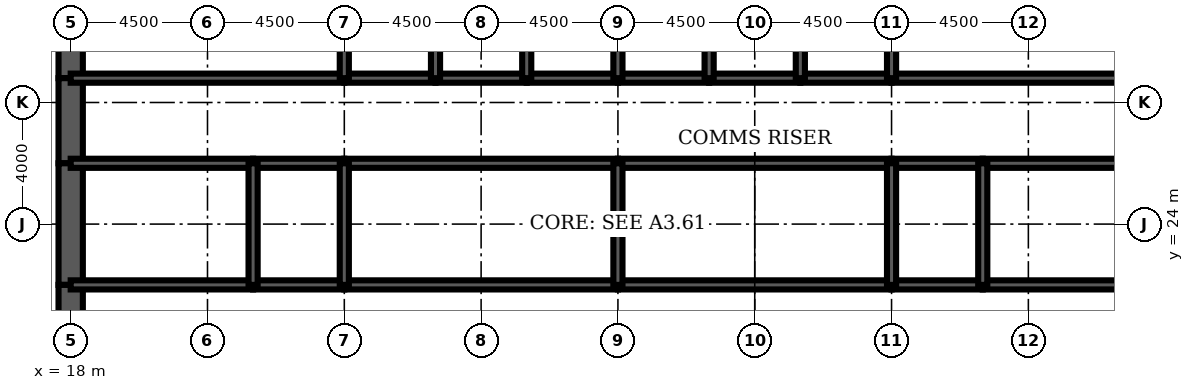
"""IFC4 building model, lengths in metres.
Left out: names, types, materials, properties, quantities, classifications, styles, units other than length and angle.
Written with IfcOpenShell. Run it as: python <this file> out.ifc"""

import sys

from ifc_helpers import new_model, si_unit, direction, frame, frame_2d, origin, place, context, subcontext, project, spatial, rectangle, extrude, element, fill, save


model = new_model("IFC4")
c1 = context("Model", 3, precision=1e-05, world=origin(), true_north=direction((0.0, 1.0)))
c2 = subcontext(c1, "Body", "Model", "MODEL_VIEW")
j1 = project(units=[si_unit("LENGTHUNIT", "METRE"), si_unit("PLANEANGLEUNIT", "RADIAN")], contexts=[c1])
p1 = place(None, origin())
s1 = spatial("IfcSite", under=j1, at=p1, CompositionType="ELEMENT")
p2 = place(p1, origin())
s2 = spatial("IfcBuilding", under=s1, at=p2, CompositionType="ELEMENT")
p3 = place(p2, frame((0.0, 0.0, 261.4)))
s3 = spatial("IfcBuildingStorey", under=s2, at=p3, CompositionType="ELEMENT", Elevation=261.4)
p4 = place(p3, frame((18.0, 32.0, 0.0), z_axis=(0.0, 0.0, 1.0), x_axis=(0.0, -1.0, 0.0)))
e1 = element("IfcWall", 1, at=p4, inside=s3, PredefinedType="SHEAR", context=c2, shape_type="SweptSolid", body=[
    extrude(rectangle(XDim=3.2, YDim=0.8, at=frame_2d((1.6, 0.0))), origin(), (0.0, 0.0, 1.0), 4.2),
])
p5 = place(p3, frame((18.0, 28.8, 0.0), z_axis=(0.0, 0.0, 1.0), x_axis=(0.0, -1.0, 0.0)))
e2 = element("IfcWall", 2, at=p5, inside=s3, PredefinedType="SHEAR", context=c2, shape_type="SweptSolid", body=[
    extrude(rectangle(XDim=2.8, YDim=0.8, at=frame_2d((1.4, 0.0))), origin(), (0.0, 0.0, 1.0), 4.2),
])
p6 = place(p5, frame((0.4, 0.0, 0.0)))
e3 = element("IfcOpeningElement", 3, at=p6, cuts=e2, PredefinedType="OPENING", context=c2, shape_type="SweptSolid", body=[
    extrude(rectangle(XDim=1.8, YDim=2.1, at=frame_2d((0.9, 1.05))), frame((0.0, 0.41, 0.0), z_axis=(0.0, -1.0, 0.0), x_axis=(1.0, 0.0, 0.0)), (0.0, 0.0, 1.0), 0.82),
])
p7 = place(p3, frame((18.0, 26.0, 0.0), z_axis=(0.0, 0.0, 1.0), x_axis=(0.0, -1.0, 0.0)))
e4 = element("IfcWall", 4, at=p7, inside=s3, PredefinedType="SHEAR", context=c2, shape_type="SweptSolid", body=[
    extrude(rectangle(XDim=4.0, YDim=0.8, at=frame_2d((2.0, 0.0))), origin(), (0.0, 0.0, 1.0), 4.2),
])
p8 = place(p3, frame((18.0, 22.0, 0.0), z_axis=(0.0, 0.0, 1.0), x_axis=(0.0, -1.0, 0.0)))
e5 = element("IfcWall", 5, at=p8, inside=s3, PredefinedType="SHEAR", context=c2, shape_type="SweptSolid", body=[
    extrude(rectangle(XDim=2.8, YDim=0.8, at=frame_2d((1.4, 0.0))), origin(), (0.0, 0.0, 1.0), 4.2),
])
p9 = place(p8, frame((0.6, 0.0, 0.0)))
e6 = element("IfcOpeningElement", 6, at=p9, cuts=e5, PredefinedType="OPENING", context=c2, shape_type="SweptSolid", body=[
    extrude(rectangle(XDim=1.8, YDim=2.1, at=frame_2d((0.9, 1.05))), frame((0.0, 0.41, 0.0), z_axis=(0.0, -1.0, 0.0), x_axis=(1.0, 0.0, 0.0)), (0.0, 0.0, 1.0), 0.82),
])
p10 = place(p3, frame((18.0, 28.8, 0.0), z_axis=(0.0, 0.0, 1.0), x_axis=(1.0, 0.0, 0.0)))
e7 = element("IfcWall", 7, at=p10, inside=s3, PredefinedType="SOLIDWALL", context=c2, shape_type="SweptSolid", body=[
    extrude(rectangle(XDim=9.0, YDim=0.3, at=frame_2d((4.5, 0.0))), origin(), (0.0, 0.0, 1.0), 4.2),
])
p11 = place(p10, frame((0.65, 0.0, 0.0)))
e8 = element("IfcOpeningElement", 8, at=p11, cuts=e7, PredefinedType="OPENING", context=c2, shape_type="SweptSolid", body=[
    extrude(rectangle(XDim=1.0, YDim=2.1, at=frame_2d((0.5, 1.05))), frame((0.0, 0.16, 0.0), z_axis=(0.0, -1.0, 0.0), x_axis=(1.0, 0.0, 0.0)), (0.0, 0.0, 1.0), 0.32),
])
p12 = place(p3, frame((27.0, 28.8, 0.0), z_axis=(0.0, 0.0, 1.0), x_axis=(1.0, 0.0, 0.0)))
e9 = element("IfcWall", 9, at=p12, inside=s3, PredefinedType="SOLIDWALL", context=c2, shape_type="SweptSolid", body=[
    extrude(rectangle(XDim=3.0, YDim=0.3, at=frame_2d((1.5, 0.0))), origin(), (0.0, 0.0, 1.0), 4.2),
])
p13 = place(p12, frame((0.95, 0.0, 0.0)))
e10 = element("IfcOpeningElement", 10, at=p13, cuts=e9, PredefinedType="OPENING", context=c2, shape_type="SweptSolid", body=[
    extrude(rectangle(XDim=1.1, YDim=2.2, at=frame_2d((0.55, 1.1))), frame((0.0, 0.16, 0.0), z_axis=(0.0, -1.0, 0.0), x_axis=(1.0, 0.0, 0.0)), (0.0, 0.0, 1.0), 0.32),
])
p14 = place(p3, frame((30.0, 28.8, 0.0), z_axis=(0.0, 0.0, 1.0), x_axis=(1.0, 0.0, 0.0)))
e11 = element("IfcWall", 11, at=p14, inside=s3, PredefinedType="SOLIDWALL", context=c2, shape_type="SweptSolid", body=[
    extrude(rectangle(XDim=3.0, YDim=0.3, at=frame_2d((1.5, 0.0))), origin(), (0.0, 0.0, 1.0), 4.2),
])
p15 = place(p14, frame((0.95, 0.0, 0.0)))
e12 = element("IfcOpeningElement", 12, at=p15, cuts=e11, PredefinedType="OPENING", context=c2, shape_type="SweptSolid", body=[
    extrude(rectangle(XDim=1.1, YDim=2.2, at=frame_2d((0.55, 1.1))), frame((0.0, 0.16, 0.0), z_axis=(0.0, -1.0, 0.0), x_axis=(1.0, 0.0, 0.0)), (0.0, 0.0, 1.0), 0.32),
])
p16 = place(p3, frame((33.0, 28.8, 0.0), z_axis=(0.0, 0.0, 1.0), x_axis=(1.0, 0.0, 0.0)))
e13 = element("IfcWall", 13, at=p16, inside=s3, PredefinedType="SOLIDWALL", context=c2, shape_type="SweptSolid", body=[
    extrude(rectangle(XDim=3.0, YDim=0.3, at=frame_2d((1.5, 0.0))), origin(), (0.0, 0.0, 1.0), 4.2),
])
p17 = place(p16, frame((0.95, 0.0, 0.0)))
e14 = element("IfcOpeningElement", 14, at=p17, cuts=e13, PredefinedType="OPENING", context=c2, shape_type="SweptSolid", body=[
    extrude(rectangle(XDim=1.1, YDim=2.2, at=frame_2d((0.55, 1.1))), frame((0.0, 0.16, 0.0), z_axis=(0.0, -1.0, 0.0), x_axis=(1.0, 0.0, 0.0)), (0.0, 0.0, 1.0), 0.32),
])
for number, where, z_axis, x_axis in (
    (15, (36.0, 28.8, 0.0), (0.0, 0.0, 1.0), (1.0, 0.0, 0.0)),
    (16, (39.0, 28.8, 0.0), (0.0, 0.0, 1.0), (1.0, 0.0, 0.0)),
):
    element("IfcWall", number, at=place(p3, frame(where, z_axis=z_axis, x_axis=x_axis)), inside=s3, PredefinedType="SOLIDWALL", context=c2, shape_type="SweptSolid", body=[
        extrude(rectangle(XDim=3.0, YDim=0.3, at=frame_2d((1.5, 0.0))), origin(), (0.0, 0.0, 1.0), 4.2),
    ])
p18 = place(p3, frame((42.0, 28.8, 0.0), z_axis=(0.0, 0.0, 1.0), x_axis=(1.0, 0.0, 0.0)))
e17 = element("IfcWall", 17, at=p18, inside=s3, PredefinedType="SOLIDWALL", context=c2, shape_type="SweptSolid", body=[
    extrude(rectangle(XDim=3.0, YDim=0.3, at=frame_2d((1.5, 0.0))), origin(), (0.0, 0.0, 1.0), 4.2),
])
p19 = place(p18, frame((0.95, 0.0, 0.0)))
e18 = element("IfcOpeningElement", 18, at=p19, cuts=e17, PredefinedType="OPENING", context=c2, shape_type="SweptSolid", body=[
    extrude(rectangle(XDim=1.1, YDim=2.2, at=frame_2d((0.55, 1.1))), frame((0.0, 0.16, 0.0), z_axis=(0.0, -1.0, 0.0), x_axis=(1.0, 0.0, 0.0)), (0.0, 0.0, 1.0), 0.32),
])
p20 = place(p3, frame((45.0, 28.8, 0.0), z_axis=(0.0, 0.0, 1.0), x_axis=(1.0, 0.0, 0.0)))
e19 = element("IfcWall", 19, at=p20, inside=s3, PredefinedType="SOLIDWALL", context=c2, shape_type="SweptSolid", body=[
    extrude(rectangle(XDim=9.0, YDim=0.3, at=frame_2d((4.5, 0.0))), origin(), (0.0, 0.0, 1.0), 4.2),
])
p21 = place(p20, frame((7.35, 0.0, 0.0)))
e20 = element("IfcOpeningElement", 20, at=p21, cuts=e19, PredefinedType="OPENING", context=c2, shape_type="SweptSolid", body=[
    extrude(rectangle(XDim=1.0, YDim=2.1, at=frame_2d((0.5, 1.05))), frame((0.0, 0.16, 0.0), z_axis=(0.0, -1.0, 0.0), x_axis=(1.0, 0.0, 0.0)), (0.0, 0.0, 1.0), 0.32),
])
p22 = place(p3, frame((18.0, 22.0, 0.0), z_axis=(0.0, 0.0, 1.0), x_axis=(1.0, 0.0, 0.0)))
e21 = element("IfcWall", 21, at=p22, inside=s3, PredefinedType="SOLIDWALL", context=c2, shape_type="SweptSolid", body=[
    extrude(rectangle(XDim=6.0, YDim=0.3, at=frame_2d((3.0, 0.0))), origin(), (0.0, 0.0, 1.0), 4.2),
])
p23 = place(p22, frame((4.4, 0.0, 0.0)))
e22 = element("IfcOpeningElement", 22, at=p23, cuts=e21, PredefinedType="OPENING", context=c2, shape_type="SweptSolid", body=[
    extrude(rectangle(XDim=1.0, YDim=2.1, at=frame_2d((0.5, 1.05))), frame((0.0, 0.16, 0.0), z_axis=(0.0, -1.0, 0.0), x_axis=(1.0, 0.0, 0.0)), (0.0, 0.0, 1.0), 0.32),
])
p24 = place(p22, frame((0.95, 0.0, 0.0)))
e23 = element("IfcOpeningElement", 23, at=p24, cuts=e21, PredefinedType="OPENING", context=c2, shape_type="SweptSolid", body=[
    extrude(rectangle(XDim=1.0, YDim=2.1, at=frame_2d((0.5, 1.05))), frame((0.0, 0.16, 0.0), z_axis=(0.0, -1.0, 0.0), x_axis=(1.0, 0.0, 0.0)), (0.0, 0.0, 1.0), 0.32),
])
p25 = place(p3, frame((24.0, 22.0, 0.0), z_axis=(0.0, 0.0, 1.0), x_axis=(1.0, 0.0, 0.0)))
e24 = element("IfcWall", 24, at=p25, inside=s3, PredefinedType="SOLIDWALL", context=c2, shape_type="SweptSolid", body=[
    extrude(rectangle(XDim=3.0, YDim=0.3, at=frame_2d((1.5, 0.0))), origin(), (0.0, 0.0, 1.0), 4.2),
])
p26 = place(p25, frame((1.0, 0.0, 0.0)))
e25 = element("IfcOpeningElement", 25, at=p26, cuts=e24, PredefinedType="OPENING", context=c2, shape_type="SweptSolid", body=[
    extrude(rectangle(XDim=1.0, YDim=2.1, at=frame_2d((0.5, 1.05))), frame((0.0, 0.16, 0.0), z_axis=(0.0, -1.0, 0.0), x_axis=(1.0, 0.0, 0.0)), (0.0, 0.0, 1.0), 0.32),
])
p27 = place(p3, frame((27.0, 22.0, 0.0), z_axis=(0.0, 0.0, 1.0), x_axis=(1.0, 0.0, 0.0)))
e26 = element("IfcWall", 26, at=p27, inside=s3, PredefinedType="SOLIDWALL", context=c2, shape_type="SweptSolid", body=[
    extrude(rectangle(XDim=9.0, YDim=0.3, at=frame_2d((4.5, 0.0))), origin(), (0.0, 0.0, 1.0), 4.2),
])
p28 = place(p27, frame((4.0, 0.0, 0.0)))
e27 = element("IfcOpeningElement", 27, at=p28, cuts=e26, PredefinedType="OPENING", context=c2, shape_type="SweptSolid", body=[
    extrude(rectangle(XDim=1.0, YDim=2.1, at=frame_2d((0.5, 1.05))), frame((0.0, 0.16, 0.0), z_axis=(0.0, -1.0, 0.0), x_axis=(1.0, 0.0, 0.0)), (0.0, 0.0, 1.0), 0.32),
])
p29 = place(p3, frame((36.0, 22.0, 0.0), z_axis=(0.0, 0.0, 1.0), x_axis=(1.0, 0.0, 0.0)))
e28 = element("IfcWall", 28, at=p29, inside=s3, PredefinedType="SOLIDWALL", context=c2, shape_type="SweptSolid", body=[
    extrude(rectangle(XDim=9.0, YDim=0.3, at=frame_2d((4.5, 0.0))), origin(), (0.0, 0.0, 1.0), 4.2),
])
p30 = place(p29, frame((4.0, 0.0, 0.0)))
e29 = element("IfcOpeningElement", 29, at=p30, cuts=e28, PredefinedType="OPENING", context=c2, shape_type="SweptSolid", body=[
    extrude(rectangle(XDim=1.0, YDim=2.1, at=frame_2d((0.5, 1.05))), frame((0.0, 0.16, 0.0), z_axis=(0.0, -1.0, 0.0), x_axis=(1.0, 0.0, 0.0)), (0.0, 0.0, 1.0), 0.32),
])
p31 = place(p3, frame((45.0, 22.0, 0.0), z_axis=(0.0, 0.0, 1.0), x_axis=(1.0, 0.0, 0.0)))
e30 = element("IfcWall", 30, at=p31, inside=s3, PredefinedType="SOLIDWALL", context=c2, shape_type="SweptSolid", body=[
    extrude(rectangle(XDim=3.0, YDim=0.3, at=frame_2d((1.5, 0.0))), origin(), (0.0, 0.0, 1.0), 4.2),
])
p32 = place(p31, frame((1.0, 0.0, 0.0)))
e31 = element("IfcOpeningElement", 31, at=p32, cuts=e30, PredefinedType="OPENING", context=c2, shape_type="SweptSolid", body=[
    extrude(rectangle(XDim=1.0, YDim=2.1, at=frame_2d((0.5, 1.05))), frame((0.0, 0.16, 0.0), z_axis=(0.0, -1.0, 0.0), x_axis=(1.0, 0.0, 0.0)), (0.0, 0.0, 1.0), 0.32),
])
p33 = place(p3, frame((48.0, 22.0, 0.0), z_axis=(0.0, 0.0, 1.0), x_axis=(1.0, 0.0, 0.0)))
e32 = element("IfcWall", 32, at=p33, inside=s3, PredefinedType="SOLIDWALL", context=c2, shape_type="SweptSolid", body=[
    extrude(rectangle(XDim=6.0, YDim=0.3, at=frame_2d((3.0, 0.0))), origin(), (0.0, 0.0, 1.0), 4.2),
])
p34 = place(p33, frame((2.0, 0.0, 0.0)))
e33 = element("IfcOpeningElement", 33, at=p34, cuts=e32, PredefinedType="OPENING", context=c2, shape_type="SweptSolid", body=[
    extrude(rectangle(XDim=1.0, YDim=2.1, at=frame_2d((0.5, 1.05))), frame((0.0, 0.16, 0.0), z_axis=(0.0, -1.0, 0.0), x_axis=(1.0, 0.0, 0.0)), (0.0, 0.0, 1.0), 0.32),
])
p35 = place(p33, frame((4.05, 0.0, 0.0)))
e34 = element("IfcOpeningElement", 34, at=p35, cuts=e32, PredefinedType="OPENING", context=c2, shape_type="SweptSolid", body=[
    extrude(rectangle(XDim=1.0, YDim=2.1, at=frame_2d((0.5, 1.05))), frame((0.0, 0.16, 0.0), z_axis=(0.0, -1.0, 0.0), x_axis=(1.0, 0.0, 0.0)), (0.0, 0.0, 1.0), 0.32),
])
p36 = place(p3, frame((18.0, 26.0, 0.0), z_axis=(0.0, 0.0, 1.0), x_axis=(1.0, 0.0, 0.0)))
e35 = element("IfcWall", 35, at=p36, inside=s3, PredefinedType="SOLIDWALL", context=c2, shape_type="SweptSolid", body=[
    extrude(rectangle(XDim=6.0, YDim=0.3, at=frame_2d((3.0, 0.0))), origin(), (0.0, 0.0, 1.0), 4.2),
])
p37 = place(p3, frame((24.0, 26.0, 0.0), z_axis=(0.0, 0.0, 1.0), x_axis=(1.0, 0.0, 0.0)))
e36 = element("IfcWall", 36, at=p37, inside=s3, PredefinedType="SOLIDWALL", context=c2, shape_type="SweptSolid", body=[
    extrude(rectangle(XDim=3.0, YDim=0.3, at=frame_2d((1.5, 0.0))), origin(), (0.0, 0.0, 1.0), 4.2),
])
for number, where, z_axis, x_axis in (
    (37, (27.0, 26.0, 0.0), (0.0, 0.0, 1.0), (1.0, 0.0, 0.0)),
    (38, (36.0, 26.0, 0.0), (0.0, 0.0, 1.0), (1.0, 0.0, 0.0)),
):
    element("IfcWall", number, at=place(p3, frame(where, z_axis=z_axis, x_axis=x_axis)), inside=s3, PredefinedType="SOLIDWALL", context=c2, shape_type="SweptSolid", body=[
        extrude(rectangle(XDim=9.0, YDim=0.3, at=frame_2d((4.5, 0.0))), origin(), (0.0, 0.0, 1.0), 4.2),
    ])
p38 = place(p3, frame((45.0, 26.0, 0.0), z_axis=(0.0, 0.0, 1.0), x_axis=(1.0, 0.0, 0.0)))
e39 = element("IfcWall", 39, at=p38, inside=s3, PredefinedType="SOLIDWALL", context=c2, shape_type="SweptSolid", body=[
    extrude(rectangle(XDim=3.0, YDim=0.3, at=frame_2d((1.5, 0.0))), origin(), (0.0, 0.0, 1.0), 4.2),
])
p39 = place(p3, frame((48.0, 26.0, 0.0), z_axis=(0.0, 0.0, 1.0), x_axis=(1.0, 0.0, 0.0)))
e40 = element("IfcWall", 40, at=p39, inside=s3, PredefinedType="SOLIDWALL", context=c2, shape_type="SweptSolid", body=[
    extrude(rectangle(XDim=6.0, YDim=0.3, at=frame_2d((3.0, 0.0))), origin(), (0.0, 0.0, 1.0), 4.2),
])
for number, where, z_axis, x_axis in (
    (41, (27.0, 28.8, 0.0), (0.0, 0.0, 1.0), (0.0, 1.0, 0.0)),
    (42, (30.0, 28.8, 0.0), (0.0, 0.0, 1.0), (0.0, 1.0, 0.0)),
    (43, (33.0, 28.8, 0.0), (0.0, 0.0, 1.0), (0.0, 1.0, 0.0)),
    (44, (36.0, 28.8, 0.0), (0.0, 0.0, 1.0), (0.0, 1.0, 0.0)),
    (45, (39.0, 28.8, 0.0), (0.0, 0.0, 1.0), (0.0, 1.0, 0.0)),
    (46, (42.0, 28.8, 0.0), (0.0, 0.0, 1.0), (0.0, 1.0, 0.0)),
    (47, (45.0, 28.8, 0.0), (0.0, 0.0, 1.0), (0.0, 1.0, 0.0)),
):
    element("IfcWall", number, at=place(p3, frame(where, z_axis=z_axis, x_axis=x_axis)), inside=s3, PredefinedType="SOLIDWALL", context=c2, shape_type="SweptSolid", body=[
        extrude(rectangle(XDim=3.2, YDim=0.3, at=frame_2d((1.6, 0.0))), origin(), (0.0, 0.0, 1.0), 4.2),
    ])
for number, where, z_axis, x_axis in (
    (48, (24.0, 22.0, 0.0), (0.0, 0.0, 1.0), (0.0, 1.0, 0.0)),
    (49, (27.0, 22.0, 0.0), (0.0, 0.0, 1.0), (0.0, 1.0, 0.0)),
    (50, (36.0, 22.0, 0.0), (0.0, 0.0, 1.0), (0.0, 1.0, 0.0)),
    (51, (45.0, 22.0, 0.0), (0.0, 0.0, 1.0), (0.0, 1.0, 0.0)),
    (52, (48.0, 22.0, 0.0), (0.0, 0.0, 1.0), (0.0, 1.0, 0.0)),
):
    element("IfcWall", number, at=place(p3, frame(where, z_axis=z_axis, x_axis=x_axis)), inside=s3, PredefinedType="SOLIDWALL", context=c2, shape_type="SweptSolid", body=[
        extrude(rectangle(XDim=4.0, YDim=0.3, at=frame_2d((2.0, 0.0))), origin(), (0.0, 0.0, 1.0), 4.2),
    ])
for number, where, z_axis, x_axis in (
    (53, (20.575, 22.15, 0.0), (0.0, 0.0, 1.0), (0.0, 1.0, 0.0)),
    (54, (51.425, 22.15, 0.0), (0.0, 0.0, 1.0), (0.0, 1.0, 0.0)),
):
    element("IfcWall", number, at=place(p3, frame(where, z_axis=z_axis, x_axis=x_axis)), inside=s3, PredefinedType="PARTITIONING", context=c2, shape_type="SweptSolid", body=[
        extrude(rectangle(XDim=3.7, YDim=0.15, at=frame_2d((1.85, 0.0))), origin(), (0.0, 0.0, 1.0), 3.0),
    ])
p40 = place(p3, frame((22.2, 26.15, 0.0), z_axis=(0.0, 0.0, 1.0), x_axis=(0.0, 1.0, 0.0)))
e55 = element("IfcWall", 55, at=p40, inside=s3, PredefinedType="PARTITIONING", context=c2, shape_type="SweptSolid", body=[
    extrude(rectangle(XDim=2.5, YDim=0.15, at=frame_2d((1.25, 0.0))), origin(), (0.0, 0.0, 1.0), 3.0),
])
p41 = place(p40, frame((0.35, 0.0, 0.0)))
e56 = element("IfcOpeningElement", 56, at=p41, cuts=e55, PredefinedType="OPENING", context=c2, shape_type="SweptSolid", body=[
    extrude(rectangle(XDim=1.0, YDim=2.1, at=frame_2d((0.5, 1.05))), frame((0.0, 0.085, 0.0), z_axis=(0.0, -1.0, 0.0), x_axis=(1.0, 0.0, 0.0)), (0.0, 0.0, 1.0), 0.17),
])
p42 = place(p41, origin())
e57 = element("IfcDoor", 57, at=p42, inside=s3, OperationType="SINGLE_SWING_LEFT", PredefinedType="DOOR", context=c2, shape_type="SweptSolid", body=[
    extrude(rectangle(XDim=1.0, YDim=2.1, at=frame_2d((0.5, 1.05))), frame((0.0, 0.025, 0.0), z_axis=(0.0, -1.0, 0.0), x_axis=(1.0, 0.0, 0.0)), (0.0, 0.0, 1.0), 0.05),
])
fill(e56, e57)
p43 = place(p19, origin())
e58 = element("IfcDoor", 58, at=p43, inside=s3, OperationType="DOUBLE_DOOR_SLIDING", PredefinedType="USERDEFINED", context=c2, shape_type="SweptSolid", body=[
    extrude(rectangle(XDim=1.1, YDim=2.2, at=frame_2d((0.55, 1.1))), frame((0.0, 0.025, 0.0), z_axis=(0.0, -1.0, 0.0), x_axis=(1.0, 0.0, 0.0)), (0.0, 0.0, 1.0), 0.05),
])
fill(e18, e58)
p44 = place(p13, origin())
e59 = element("IfcDoor", 59, at=p44, inside=s3, OperationType="DOUBLE_DOOR_SLIDING", PredefinedType="USERDEFINED", context=c2, shape_type="SweptSolid", body=[
    extrude(rectangle(XDim=1.1, YDim=2.2, at=frame_2d((0.55, 1.1))), frame((0.0, 0.025, 0.0), z_axis=(0.0, -1.0, 0.0), x_axis=(1.0, 0.0, 0.0)), (0.0, 0.0, 1.0), 0.05),
])
fill(e10, e59)
p45 = place(p15, origin())
e60 = element("IfcDoor", 60, at=p45, inside=s3, OperationType="DOUBLE_DOOR_SLIDING", PredefinedType="USERDEFINED", context=c2, shape_type="SweptSolid", body=[
    extrude(rectangle(XDim=1.1, YDim=2.2, at=frame_2d((0.55, 1.1))), frame((0.0, 0.025, 0.0), z_axis=(0.0, -1.0, 0.0), x_axis=(1.0, 0.0, 0.0)), (0.0, 0.0, 1.0), 0.05),
])
fill(e12, e60)
p46 = place(p17, origin())
e61 = element("IfcDoor", 61, at=p46, inside=s3, OperationType="DOUBLE_DOOR_SLIDING", PredefinedType="USERDEFINED", context=c2, shape_type="SweptSolid", body=[
    extrude(rectangle(XDim=1.1, YDim=2.2, at=frame_2d((0.55, 1.1))), frame((0.0, 0.025, 0.0), z_axis=(0.0, -1.0, 0.0), x_axis=(1.0, 0.0, 0.0)), (0.0, 0.0, 1.0), 0.05),
])
fill(e14, e61)
p47 = place(p11, origin())
e62 = element("IfcDoor", 62, at=p47, inside=s3, OperationType="SINGLE_SWING_LEFT", PredefinedType="DOOR", context=c2, shape_type="SweptSolid", body=[
    extrude(rectangle(XDim=1.0, YDim=2.1, at=frame_2d((0.5, 1.05))), frame((0.0, 0.025, 0.0), z_axis=(0.0, -1.0, 0.0), x_axis=(1.0, 0.0, 0.0)), (0.0, 0.0, 1.0), 0.05),
])
fill(e8, e62)
p48 = place(p9, origin())
e63 = element("IfcDoor", 63, at=p48, inside=s3, OperationType="SINGLE_SWING_LEFT", PredefinedType="DOOR", context=c2, shape_type="SweptSolid", body=[
    extrude(rectangle(XDim=1.8, YDim=2.1, at=frame_2d((0.9, 1.05))), frame((0.0, 0.4, 0.0), z_axis=(0.0, -1.0, 0.0), x_axis=(1.0, 0.0, 0.0)), (0.0, 0.0, 1.0), 0.8),
])
fill(e6, e63)
p49 = place(p6, origin())
e64 = element("IfcDoor", 64, at=p49, inside=s3, OperationType="SINGLE_SWING_LEFT", PredefinedType="DOOR", context=c2, shape_type="SweptSolid", body=[
    extrude(rectangle(XDim=1.8, YDim=2.1, at=frame_2d((0.9, 1.05))), frame((0.0, 0.4, 0.0), z_axis=(0.0, -1.0, 0.0), x_axis=(1.0, 0.0, 0.0)), (0.0, 0.0, 1.0), 0.8),
])
fill(e3, e64)
p50 = place(p23, origin())
e65 = element("IfcDoor", 65, at=p50, inside=s3, OperationType="SINGLE_SWING_RIGHT", PredefinedType="DOOR", context=c2, shape_type="SweptSolid", body=[
    extrude(rectangle(XDim=1.0, YDim=2.1, at=frame_2d((0.5, 1.05))), frame((0.0, 0.025, 0.0), z_axis=(0.0, -1.0, 0.0), x_axis=(1.0, 0.0, 0.0)), (0.0, 0.0, 1.0), 0.05),
])
fill(e22, e65)
p51 = place(p26, origin())
e66 = element("IfcDoor", 66, at=p51, inside=s3, OperationType="SINGLE_SWING_LEFT", PredefinedType="DOOR", context=c2, shape_type="SweptSolid", body=[
    extrude(rectangle(XDim=1.0, YDim=2.1, at=frame_2d((0.5, 1.05))), frame((0.0, 0.025, 0.0), z_axis=(0.0, -1.0, 0.0), x_axis=(1.0, 0.0, 0.0)), (0.0, 0.0, 1.0), 0.05),
])
fill(e25, e66)
p52 = place(p28, origin())
e67 = element("IfcDoor", 67, at=p52, inside=s3, OperationType="SINGLE_SWING_LEFT", PredefinedType="DOOR", context=c2, shape_type="SweptSolid", body=[
    extrude(rectangle(XDim=1.0, YDim=2.1, at=frame_2d((0.5, 1.05))), frame((0.0, 0.025, 0.0), z_axis=(0.0, -1.0, 0.0), x_axis=(1.0, 0.0, 0.0)), (0.0, 0.0, 1.0), 0.05),
])
fill(e27, e67)
p53 = place(p30, origin())
e68 = element("IfcDoor", 68, at=p53, inside=s3, OperationType="SINGLE_SWING_LEFT", PredefinedType="DOOR", context=c2, shape_type="SweptSolid", body=[
    extrude(rectangle(XDim=1.0, YDim=2.1, at=frame_2d((0.5, 1.05))), frame((0.0, 0.025, 0.0), z_axis=(0.0, -1.0, 0.0), x_axis=(1.0, 0.0, 0.0)), (0.0, 0.0, 1.0), 0.05),
])
fill(e29, e68)
p54 = place(p32, origin())
e69 = element("IfcDoor", 69, at=p54, inside=s3, OperationType="SINGLE_SWING_LEFT", PredefinedType="DOOR", context=c2, shape_type="SweptSolid", body=[
    extrude(rectangle(XDim=1.0, YDim=2.1, at=frame_2d((0.5, 1.05))), frame((0.0, 0.025, 0.0), z_axis=(0.0, -1.0, 0.0), x_axis=(1.0, 0.0, 0.0)), (0.0, 0.0, 1.0), 0.05),
])
fill(e31, e69)
p55 = place(p34, origin())
e70 = element("IfcDoor", 70, at=p55, inside=s3, OperationType="SINGLE_SWING_LEFT", PredefinedType="DOOR", context=c2, shape_type="SweptSolid", body=[
    extrude(rectangle(XDim=1.0, YDim=2.1, at=frame_2d((0.5, 1.05))), frame((0.0, 0.025, 0.0), z_axis=(0.0, -1.0, 0.0), x_axis=(1.0, 0.0, 0.0)), (0.0, 0.0, 1.0), 0.05),
])
fill(e33, e70)
p56 = place(p24, origin())
e71 = element("IfcDoor", 71, at=p56, inside=s3, OperationType="SINGLE_SWING_LEFT", PredefinedType="DOOR", context=c2, shape_type="SweptSolid", body=[
    extrude(rectangle(XDim=1.0, YDim=2.1, at=frame_2d((0.5, 1.05))), frame((0.0, 0.025, 0.0), z_axis=(0.0, -1.0, 0.0), x_axis=(1.0, 0.0, 0.0)), (0.0, 0.0, 1.0), 0.05),
])
fill(e23, e71)
p57 = place(p35, origin())
e72 = element("IfcDoor", 72, at=p57, inside=s3, OperationType="SINGLE_SWING_RIGHT", PredefinedType="DOOR", context=c2, shape_type="SweptSolid", body=[
    extrude(rectangle(XDim=1.0, YDim=2.1, at=frame_2d((0.5, 1.05))), frame((0.0, 0.025, 0.0), z_axis=(0.0, -1.0, 0.0), x_axis=(1.0, 0.0, 0.0)), (0.0, 0.0, 1.0), 0.05),
])
fill(e34, e72)
save(model, sys.argv[1])
